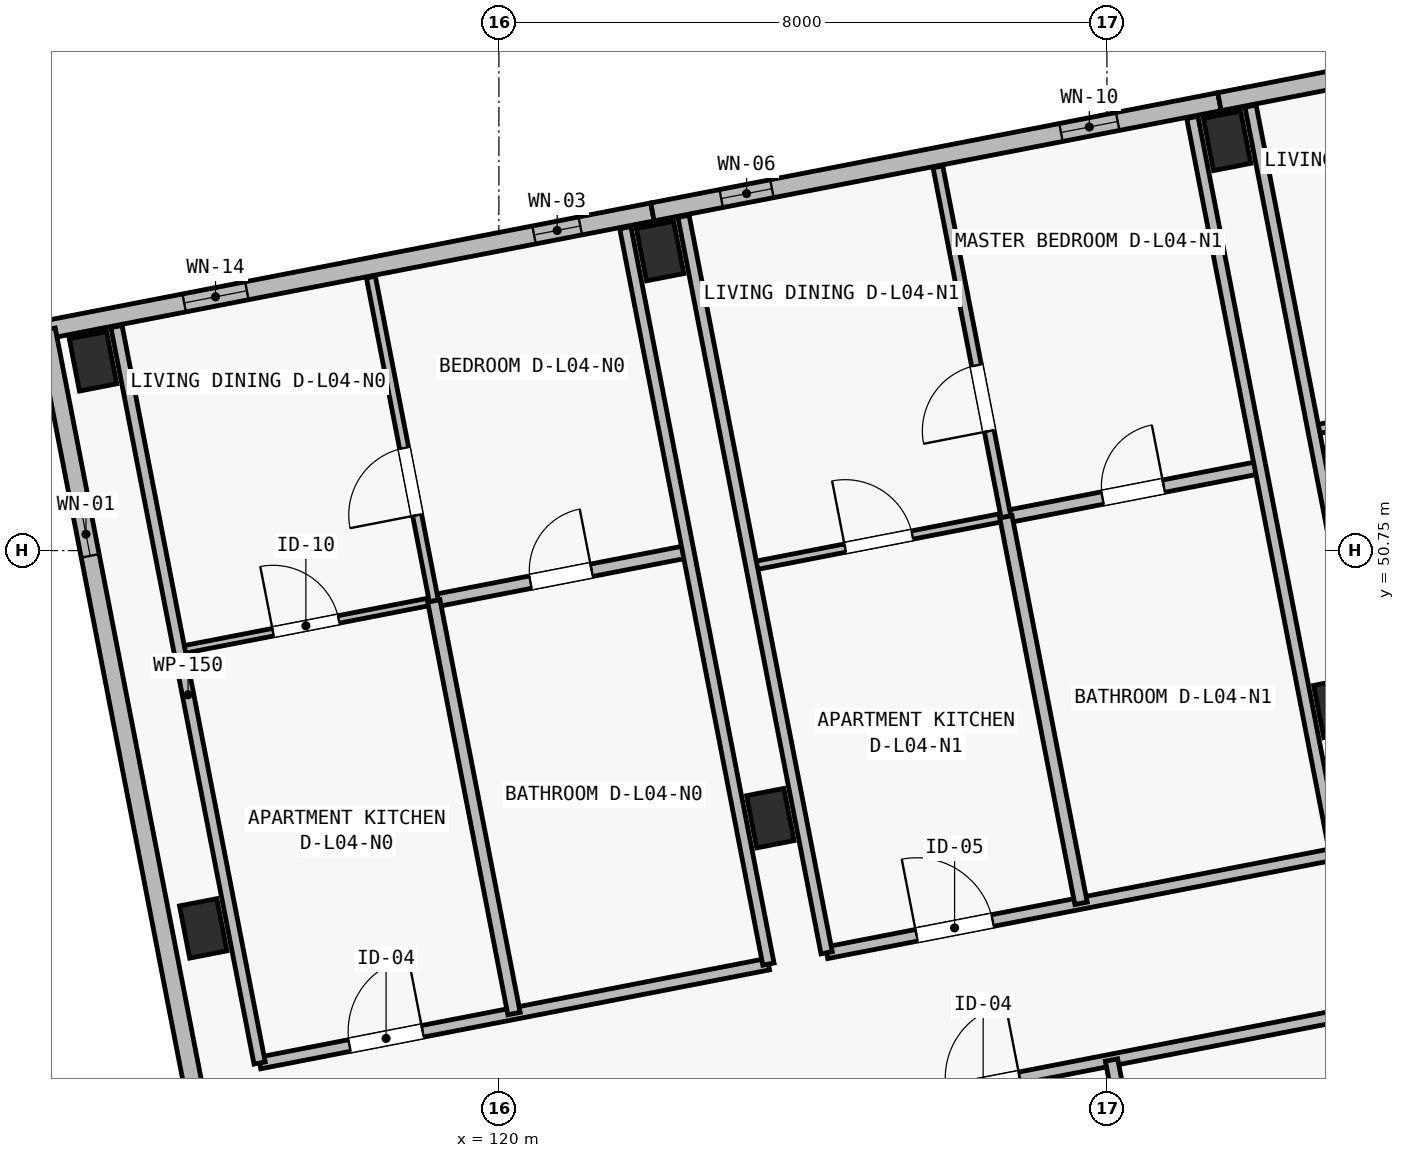
"""IFC4 building model, lengths in metres.
Left out: names, types, materials, properties, quantities, classifications, styles, units other than length and angle.
Written with IfcOpenShell. Run it as: python <this file> out.ifc"""

import sys

from ifc_helpers import new_model, si_unit, direction, frame, frame_2d, origin, origin_2d, place, context, subcontext, project, spatial, rectangle, extrude, element, fill, save


model = new_model("IFC4")
c1 = context("Model", 3, precision=1e-05, world=origin(), true_north=direction((0.0, 1.0)))
c2 = subcontext(c1, "Body", "Model", "MODEL_VIEW")
j1 = project(units=[si_unit("LENGTHUNIT", "METRE"), si_unit("PLANEANGLEUNIT", "RADIAN")], contexts=[c1])
p1 = place(None, origin())
s1 = spatial("IfcSite", under=j1, at=p1, CompositionType="ELEMENT")
p2 = place(p1, origin())
s2 = spatial("IfcBuilding", under=s1, at=p2, CompositionType="ELEMENT")
p3 = place(p2, frame((0.0, 0.0, 14.9)))
s3 = spatial("IfcBuildingStorey", under=s2, at=p3, CompositionType="ELEMENT", Elevation=14.9)
for number, where, z_axis, x_axis in (
    (1, (116.11, 45.78, 0.0), (0.0, 0.0, 1.0), (0.982, 0.191, 0.0)),
    (2, (114.66, 53.24, 0.0), (0.0, 0.0, 1.0), (0.982, 0.191, 0.0)),
    (3, (123.571, 47.23, 0.0), (0.0, 0.0, 1.0), (0.982, 0.191, 0.0)),
    (4, (122.121, 54.69, 0.0), (0.0, 0.0, 1.0), (0.982, 0.191, 0.0)),
    (5, (131.031, 48.68, 0.0), (0.0, 0.0, 1.0), (0.982, 0.191, 0.0)),
    (6, (129.581, 56.14, 0.0), (0.0, 0.0, 1.0), (0.982, 0.191, 0.0)),
):
    element("IfcColumn", number, at=place(p3, frame(where, z_axis=z_axis, x_axis=x_axis)), inside=s3, PredefinedType="COLUMN", context=c2, shape_type="SweptSolid", body=[
        extrude(rectangle(XDim=0.5, YDim=0.7, at=origin_2d()), origin(), (0.0, 0.0, 1.0), 3.25),
    ])
p4 = place(p3, frame((114.045, 53.655, 0.0), z_axis=(0.0, 0.0, 1.0), x_axis=(0.981627273155, 0.190808533872, 0.0)))
e7 = element("IfcWall", 7, at=p4, inside=s3, PredefinedType="SOLIDWALL", context=c2, shape_type="SweptSolid", body=[
    extrude(rectangle(XDim=8.125, YDim=0.24, at=frame_2d((4.062, 0.0))), origin(), (0.0, 0.0, 1.0), 3.0),
])
p5 = place(p4, frame((1.849, 0.0, 0.44)))
e8 = element("IfcOpeningElement", 8, at=p5, cuts=e7, PredefinedType="OPENING", context=c2, shape_type="SweptSolid", body=[
    extrude(rectangle(XDim=0.84, YDim=2.28, at=frame_2d((0.42, 1.14))), frame((0.0, 0.135, 0.0), z_axis=(0.0, -1.0, 0.0), x_axis=(1.0, 0.0, 0.0)), (0.0, 0.0, 1.0), 0.27),
])
p6 = place(p4, frame((6.538, 0.0, 0.5)))
e9 = element("IfcOpeningElement", 9, at=p6, cuts=e7, PredefinedType="OPENING", context=c2, shape_type="SweptSolid", body=[
    extrude(rectangle(XDim=0.62, YDim=2.28, at=frame_2d((0.31, 1.14))), frame((0.0, 0.135, 0.0), z_axis=(0.0, -1.0, 0.0), x_axis=(1.0, 0.0, 0.0)), (0.0, 0.0, 1.0), 0.27),
])
p7 = place(p3, frame((122.02, 55.205, 0.0), z_axis=(0.0, 0.0, 1.0), x_axis=(0.981626422232, 0.190812911449, 0.0)))
e10 = element("IfcWall", 10, at=p7, inside=s3, PredefinedType="SOLIDWALL", context=c2, shape_type="SweptSolid", body=[
    extrude(rectangle(XDim=7.6, YDim=0.24, at=frame_2d((3.8, 0.0))), origin(), (0.0, 0.0, 1.0), 3.0),
])
p8 = place(p7, frame((0.922, 0.0, 0.5)))
e11 = element("IfcOpeningElement", 11, at=p8, cuts=e10, PredefinedType="OPENING", context=c2, shape_type="SweptSolid", body=[
    extrude(rectangle(XDim=0.68, YDim=2.24, at=frame_2d((0.34, 1.12))), frame((0.0, 0.135, 0.0), z_axis=(0.0, -1.0, 0.0), x_axis=(1.0, 0.0, 0.0)), (0.0, 0.0, 1.0), 0.27),
])
p9 = place(p7, frame((5.476, 0.0, 0.44)))
e12 = element("IfcOpeningElement", 12, at=p9, cuts=e10, PredefinedType="OPENING", context=c2, shape_type="SweptSolid", body=[
    extrude(rectangle(XDim=0.76, YDim=2.34, at=frame_2d((0.38, 1.17))), frame((0.0, 0.135, 0.0), z_axis=(0.0, -1.0, 0.0), x_axis=(1.0, 0.0, 0.0)), (0.0, 0.0, 1.0), 0.27),
])
p10 = place(p3, frame((129.481, 56.656, 0.0), z_axis=(0.0, 0.0, 1.0), x_axis=(0.981626422232, 0.190812911449, 0.0)))
e13 = element("IfcWall", 13, at=p10, inside=s3, PredefinedType="SOLIDWALL", context=c2, shape_type="SweptSolid", body=[
    extrude(rectangle(XDim=7.6, YDim=0.24, at=frame_2d((3.8, 0.0))), origin(), (0.0, 0.0, 1.0), 3.0),
])
p11 = place(p10, frame((1.745, 0.0, 0.44)))
e14 = element("IfcOpeningElement", 14, at=p11, cuts=e13, PredefinedType="OPENING", context=c2, shape_type="SweptSolid", body=[
    extrude(rectangle(XDim=0.82, YDim=2.18, at=frame_2d((0.41, 1.09))), frame((0.0, 0.135, 0.0), z_axis=(0.0, -1.0, 0.0), x_axis=(1.0, 0.0, 0.0)), (0.0, 0.0, 1.0), 0.27),
])
p12 = place(p10, frame((5.05, 0.0, 0.5)))
e15 = element("IfcOpeningElement", 15, at=p12, cuts=e13, PredefinedType="OPENING", context=c2, shape_type="SweptSolid", body=[
    extrude(rectangle(XDim=0.6, YDim=2.22, at=frame_2d((0.3, 1.11))), frame((0.0, 0.135, 0.0), z_axis=(0.0, -1.0, 0.0), x_axis=(1.0, 0.0, 0.0)), (0.0, 0.0, 1.0), 0.27),
])
p13 = place(p3, frame((117.985, 33.385, 0.0), z_axis=(0.0, 0.0, 1.0), x_axis=(-0.190808900739, 0.981627201843, 0.0)))
e16 = element("IfcWall", 16, at=p13, inside=s3, PredefinedType="SOLIDWALL", context=c2, shape_type="SweptSolid", body=[
    extrude(rectangle(XDim=20.65, YDim=0.24, at=frame_2d((10.325, 0.0))), origin(), (0.0, 0.0, 1.0), 3.0),
])
p14 = place(p13, frame((2.45, 0.0, 0.45)))
e17 = element("IfcOpeningElement", 17, at=p14, cuts=e16, PredefinedType="OPENING", context=c2, shape_type="SweptSolid", body=[
    extrude(rectangle(XDim=0.74, YDim=2.26, at=frame_2d((0.37, 1.13))), frame((0.0, 0.135, 0.0), z_axis=(0.0, -1.0, 0.0), x_axis=(1.0, 0.0, 0.0)), (0.0, 0.0, 1.0), 0.27),
])
p15 = place(p13, frame((17.62, 0.0, 0.52)))
e18 = element("IfcOpeningElement", 18, at=p15, cuts=e16, PredefinedType="OPENING", context=c2, shape_type="SweptSolid", body=[
    extrude(rectangle(XDim=0.58, YDim=2.16, at=frame_2d((0.29, 1.08))), frame((0.0, 0.135, 0.0), z_axis=(0.0, -1.0, 0.0), x_axis=(1.0, 0.0, 0.0)), (0.0, 0.0, 1.0), 0.27),
])
p16 = place(p3, frame((124.585, 43.372, 0.0), z_axis=(0.0, 0.0, 1.0), x_axis=(0.9816234647, 0.190828125677, 0.0)))
e19 = element("IfcWall", 19, at=p16, inside=s3, PredefinedType="PARTITIONING", context=c2, shape_type="SweptSolid", body=[
    extrude(rectangle(XDim=7.08, YDim=0.155, at=frame_2d((3.54, 0.0))), origin(), (0.0, 0.0, 1.0), 2.97),
])
p17 = place(p16, frame((1.33, 0.0, 0.0)))
e20 = element("IfcOpeningElement", 20, at=p17, cuts=e19, PredefinedType="OPENING", context=c2, shape_type="SweptSolid", body=[
    extrude(rectangle(XDim=0.98, YDim=2.15, at=frame_2d((0.49, 1.075))), frame((0.0, 0.093, 0.0), z_axis=(0.0, -1.0, 0.0), x_axis=(1.0, 0.0, 0.0)), (0.0, 0.0, 1.0), 0.185),
])
p18 = place(p3, frame((128.77, 40.396, 0.0), z_axis=(0.0, 0.0, 1.0), x_axis=(-0.190787096078, 0.981631439987, 0.0)))
e21 = element("IfcWall", 21, at=p18, inside=s3, PredefinedType="PLUMBINGWALL", context=c2, shape_type="SweptSolid", body=[
    extrude(rectangle(XDim=3.72, YDim=0.165, at=frame_2d((1.86, 0.0))), origin(), (0.0, 0.0, 1.0), 2.97),
])
p19 = place(p3, frame((116.852, 44.009, 0.0), z_axis=(0.0, 0.0, 1.0), x_axis=(0.981629173664, 0.190798756314, 0.0)))
e22 = element("IfcWall", 22, at=p19, inside=s3, PredefinedType="PARTITIONING", context=c2, shape_type="SweptSolid", body=[
    extrude(rectangle(XDim=6.82, YDim=0.155, at=frame_2d((3.41, 0.0))), origin(), (0.0, 0.0, 1.0), 2.97),
])
p20 = place(p19, frame((1.205, 0.0, 0.0)))
e23 = element("IfcOpeningElement", 23, at=p20, cuts=e22, PredefinedType="OPENING", context=c2, shape_type="SweptSolid", body=[
    extrude(rectangle(XDim=0.98, YDim=2.15, at=frame_2d((0.49, 1.075))), frame((0.0, 0.093, 0.0), z_axis=(0.0, -1.0, 0.0), x_axis=(1.0, 0.0, 0.0)), (0.0, 0.0, 1.0), 0.185),
])
p21 = place(p3, frame((115.797, 49.437, 0.0), z_axis=(0.0, 0.0, 1.0), x_axis=(0.981615762271, 0.19086774285, 0.0)))
e24 = element("IfcWall", 24, at=p21, inside=s3, PredefinedType="PARTITIONING", context=c2, shape_type="SweptSolid", body=[
    extrude(rectangle(XDim=3.41, YDim=0.1, at=frame_2d((1.705, 0.0))), origin(), (0.0, 0.0, 1.0), 2.97),
])
p22 = place(p21, frame((1.255, 0.0, 0.0)))
e25 = element("IfcOpeningElement", 25, at=p22, cuts=e24, PredefinedType="OPENING", context=c2, shape_type="SweptSolid", body=[
    extrude(rectangle(XDim=0.88, YDim=2.1, at=frame_2d((0.44, 1.05))), frame((0.0, 0.065, 0.0), z_axis=(0.0, -1.0, 0.0), x_axis=(1.0, 0.0, 0.0)), (0.0, 0.0, 1.0), 0.13),
])
p23 = place(p3, frame((119.144, 50.088, 0.0), z_axis=(0.0, 0.0, 1.0), x_axis=(0.981629173664, 0.190798756314, 0.0)))
e26 = element("IfcWall", 26, at=p23, inside=s3, PredefinedType="PLUMBINGWALL", context=c2, shape_type="SweptSolid", body=[
    extrude(rectangle(XDim=3.41, YDim=0.165, at=frame_2d((1.705, 0.0))), origin(), (0.0, 0.0, 1.0), 2.97),
])
p24 = place(p23, frame((1.295, 0.0, 0.0)))
e27 = element("IfcOpeningElement", 27, at=p24, cuts=e26, PredefinedType="OPENING", context=c2, shape_type="SweptSolid", body=[
    extrude(rectangle(XDim=0.82, YDim=2.08, at=frame_2d((0.41, 1.04))), frame((0.0, 0.097, 0.0), z_axis=(0.0, -1.0, 0.0), x_axis=(1.0, 0.0, 0.0)), (0.0, 0.0, 1.0), 0.195),
])
p25 = place(p3, frame((119.144, 50.088, 0.0), z_axis=(0.0, 0.0, 1.0), x_axis=(-0.190812443151, 0.981626513262, 0.0)))
e28 = element("IfcWall", 28, at=p25, inside=s3, PredefinedType="PARTITIONING", context=c2, shape_type="SweptSolid", body=[
    extrude(rectangle(XDim=4.34, YDim=0.12, at=frame_2d((2.17, 0.0))), origin(), (0.0, 0.0, 1.0), 2.97),
])
p26 = place(p25, frame((1.15, 0.0, 0.0)))
e29 = element("IfcOpeningElement", 29, at=p26, cuts=e28, PredefinedType="OPENING", context=c2, shape_type="SweptSolid", body=[
    extrude(rectangle(XDim=0.9, YDim=2.1, at=frame_2d((0.45, 1.05))), frame((0.0, 0.075, 0.0), z_axis=(0.0, -1.0, 0.0), x_axis=(1.0, 0.0, 0.0)), (0.0, 0.0, 1.0), 0.15),
])
p27 = place(p3, frame((120.199, 44.659, 0.0), z_axis=(0.0, 0.0, 1.0), x_axis=(-0.190807031124, 0.981627565258, 0.0)))
e30 = element("IfcWall", 30, at=p27, inside=s3, PredefinedType="PLUMBINGWALL", context=c2, shape_type="SweptSolid", body=[
    extrude(rectangle(XDim=5.53, YDim=0.165, at=frame_2d((2.765, 0.0))), origin(), (0.0, 0.0, 1.0), 2.97),
])
p28 = place(p3, frame((116.852, 44.009, 0.0), z_axis=(0.0, 0.0, 1.0), x_axis=(-0.190814044018, 0.981626202078, 0.0)))
e31 = element("IfcWall", 31, at=p28, inside=s3, PredefinedType="PARTITIONING", context=c2, shape_type="SweptSolid", body=[
    extrude(rectangle(XDim=9.87, YDim=0.15, at=frame_2d((4.935, 0.0))), origin(), (0.0, 0.0, 1.0), 2.97),
])
p29 = place(p3, frame((123.547, 45.31, 0.0), z_axis=(0.0, 0.0, 1.0), x_axis=(-0.190809410863, 0.981627102685, 0.0)))
e32 = element("IfcWall", 32, at=p29, inside=s3, PredefinedType="PARTITIONING", context=c2, shape_type="SweptSolid", body=[
    extrude(rectangle(XDim=9.87, YDim=0.15, at=frame_2d((4.935, 0.0))), origin(), (0.0, 0.0, 1.0), 2.97),
])
p30 = place(p3, frame((124.312, 45.459, 0.0), z_axis=(0.0, 0.0, 1.0), x_axis=(0.981627870431, 0.190805461121, 0.0)))
e33 = element("IfcWall", 33, at=p30, inside=s3, PredefinedType="PARTITIONING", context=c2, shape_type="SweptSolid", body=[
    extrude(rectangle(XDim=6.82, YDim=0.155, at=frame_2d((3.41, 0.0))), origin(), (0.0, 0.0, 1.0), 2.97),
])
p31 = place(p30, frame((1.205, 0.0, 0.0)))
e34 = element("IfcOpeningElement", 34, at=p31, cuts=e33, PredefinedType="OPENING", context=c2, shape_type="SweptSolid", body=[
    extrude(rectangle(XDim=1.02, YDim=2.2, at=frame_2d((0.51, 1.1))), frame((0.0, 0.093, 0.0), z_axis=(0.0, -1.0, 0.0), x_axis=(1.0, 0.0, 0.0)), (0.0, 0.0, 1.0), 0.185),
])
p32 = place(p3, frame((123.324, 50.543, 0.0), z_axis=(0.0, 0.0, 1.0), x_axis=(0.981629173664, 0.190798756314, 0.0)))
e35 = element("IfcWall", 35, at=p32, inside=s3, PredefinedType="PARTITIONING", context=c2, shape_type="SweptSolid", body=[
    extrude(rectangle(XDim=3.41, YDim=0.11, at=frame_2d((1.705, 0.0))), origin(), (0.0, 0.0, 1.0), 2.97),
])
p33 = place(p32, frame((1.255, 0.0, 0.0)))
e36 = element("IfcOpeningElement", 36, at=p33, cuts=e35, PredefinedType="OPENING", context=c2, shape_type="SweptSolid", body=[
    extrude(rectangle(XDim=0.9, YDim=2.1, at=frame_2d((0.45, 1.05))), frame((0.0, 0.07, 0.0), z_axis=(0.0, -1.0, 0.0), x_axis=(1.0, 0.0, 0.0)), (0.0, 0.0, 1.0), 0.14),
])
p34 = place(p3, frame((126.671, 51.194, 0.0), z_axis=(0.0, 0.0, 1.0), x_axis=(0.981629173664, 0.190798756314, 0.0)))
e37 = element("IfcWall", 37, at=p34, inside=s3, PredefinedType="PLUMBINGWALL", context=c2, shape_type="SweptSolid", body=[
    extrude(rectangle(XDim=3.41, YDim=0.165, at=frame_2d((1.705, 0.0))), origin(), (0.0, 0.0, 1.0), 2.97),
])
p35 = place(p34, frame((1.295, 0.0, 0.0)))
e38 = element("IfcOpeningElement", 38, at=p35, cuts=e37, PredefinedType="OPENING", context=c2, shape_type="SweptSolid", body=[
    extrude(rectangle(XDim=0.82, YDim=2.08, at=frame_2d((0.41, 1.04))), frame((0.0, 0.097, 0.0), z_axis=(0.0, -1.0, 0.0), x_axis=(1.0, 0.0, 0.0)), (0.0, 0.0, 1.0), 0.195),
])
p36 = place(p3, frame((126.671, 51.194, 0.0), z_axis=(0.0, 0.0, 1.0), x_axis=(-0.190787451574, 0.981631370893, 0.0)))
e39 = element("IfcWall", 39, at=p36, inside=s3, PredefinedType="PARTITIONING", context=c2, shape_type="SweptSolid", body=[
    extrude(rectangle(XDim=4.69, YDim=0.13, at=frame_2d((2.345, 0.0))), origin(), (0.0, 0.0, 1.0), 2.97),
])
p37 = place(p36, frame((1.15, 0.0, 0.0)))
e40 = element("IfcOpeningElement", 40, at=p37, cuts=e39, PredefinedType="OPENING", context=c2, shape_type="SweptSolid", body=[
    extrude(rectangle(XDim=0.88, YDim=2.1, at=frame_2d((0.44, 1.05))), frame((0.0, 0.08, 0.0), z_axis=(0.0, -1.0, 0.0), x_axis=(1.0, 0.0, 0.0)), (0.0, 0.0, 1.0), 0.16),
])
p38 = place(p3, frame((127.66, 46.109, 0.0), z_axis=(0.0, 0.0, 1.0), x_axis=(-0.190838120755, 0.981621521599, 0.0)))
e41 = element("IfcWall", 41, at=p38, inside=s3, PredefinedType="PLUMBINGWALL", context=c2, shape_type="SweptSolid", body=[
    extrude(rectangle(XDim=5.18, YDim=0.165, at=frame_2d((2.59, 0.0))), origin(), (0.0, 0.0, 1.0), 2.97),
])
p39 = place(p3, frame((124.312, 45.459, 0.0), z_axis=(0.0, 0.0, 1.0), x_axis=(-0.190814044018, 0.981626202078, 0.0)))
e42 = element("IfcWall", 42, at=p39, inside=s3, PredefinedType="PARTITIONING", context=c2, shape_type="SweptSolid", body=[
    extrude(rectangle(XDim=9.87, YDim=0.15, at=frame_2d((4.935, 0.0))), origin(), (0.0, 0.0, 1.0), 2.97),
])
p40 = place(p3, frame((131.007, 46.76, 0.0), z_axis=(0.0, 0.0, 1.0), x_axis=(-0.190809410863, 0.981627102685, 0.0)))
e43 = element("IfcWall", 43, at=p40, inside=s3, PredefinedType="PARTITIONING", context=c2, shape_type="SweptSolid", body=[
    extrude(rectangle(XDim=9.87, YDim=0.15, at=frame_2d((4.935, 0.0))), origin(), (0.0, 0.0, 1.0), 2.97),
])
p41 = place(p3, frame((130.717, 52.337, 0.0), z_axis=(0.0, 0.0, 1.0), x_axis=(0.981629173664, 0.190798756314, 0.0)))
e44 = element("IfcWall", 44, at=p41, inside=s3, PredefinedType="PARTITIONING", context=c2, shape_type="SweptSolid", body=[
    extrude(rectangle(XDim=3.41, YDim=0.12, at=frame_2d((1.705, 0.0))), origin(), (0.0, 0.0, 1.0), 2.97),
])
p42 = place(p41, frame((1.255, 0.0, 0.0)))
e45 = element("IfcOpeningElement", 45, at=p42, cuts=e44, PredefinedType="OPENING", context=c2, shape_type="SweptSolid", body=[
    extrude(rectangle(XDim=0.9, YDim=2.1, at=frame_2d((0.45, 1.05))), frame((0.0, 0.075, 0.0), z_axis=(0.0, -1.0, 0.0), x_axis=(1.0, 0.0, 0.0)), (0.0, 0.0, 1.0), 0.15),
])
p43 = place(p3, frame((131.772, 46.909, 0.0), z_axis=(0.0, 0.0, 1.0), x_axis=(-0.1907855758, 0.981631735462, 0.0)))
e46 = element("IfcWall", 46, at=p43, inside=s3, PredefinedType="PARTITIONING", context=c2, shape_type="SweptSolid", body=[
    extrude(rectangle(XDim=9.87, YDim=0.15, at=frame_2d((4.935, 0.0))), origin(), (0.0, 0.0, 1.0), 2.97),
])
p44 = place(p5, origin())
e47 = element("IfcWindow", 47, at=p44, inside=s3, PartitioningType="SINGLE_PANEL", PredefinedType="WINDOW", context=c2, shape_type="SweptSolid", body=[
    extrude(rectangle(XDim=0.84, YDim=2.28, at=frame_2d((0.42, 1.14))), frame((0.0, 0.03, 0.0), z_axis=(0.0, -1.0, 0.0), x_axis=(1.0, 0.0, 0.0)), (0.0, 0.0, 1.0), 0.06),
])
fill(e8, e47)
p45 = place(p6, origin())
e48 = element("IfcWindow", 48, at=p45, inside=s3, PartitioningType="SINGLE_PANEL", PredefinedType="WINDOW", context=c2, shape_type="SweptSolid", body=[
    extrude(rectangle(XDim=0.62, YDim=2.28, at=frame_2d((0.31, 1.14))), frame((0.0, 0.03, 0.0), z_axis=(0.0, -1.0, 0.0), x_axis=(1.0, 0.0, 0.0)), (0.0, 0.0, 1.0), 0.06),
])
fill(e9, e48)
p46 = place(p8, origin())
e49 = element("IfcWindow", 49, at=p46, inside=s3, PartitioningType="SINGLE_PANEL", PredefinedType="WINDOW", context=c2, shape_type="SweptSolid", body=[
    extrude(rectangle(XDim=0.68, YDim=2.24, at=frame_2d((0.34, 1.12))), frame((0.0, 0.03, 0.0), z_axis=(0.0, -1.0, 0.0), x_axis=(1.0, 0.0, 0.0)), (0.0, 0.0, 1.0), 0.06),
])
fill(e11, e49)
p47 = place(p9, origin())
e50 = element("IfcWindow", 50, at=p47, inside=s3, PartitioningType="SINGLE_PANEL", PredefinedType="WINDOW", context=c2, shape_type="SweptSolid", body=[
    extrude(rectangle(XDim=0.76, YDim=2.34, at=frame_2d((0.38, 1.17))), frame((0.0, 0.03, 0.0), z_axis=(0.0, -1.0, 0.0), x_axis=(1.0, 0.0, 0.0)), (0.0, 0.0, 1.0), 0.06),
])
fill(e12, e50)
p48 = place(p15, origin())
e51 = element("IfcWindow", 51, at=p48, inside=s3, PartitioningType="SINGLE_PANEL", PredefinedType="WINDOW", context=c2, shape_type="SweptSolid", body=[
    extrude(rectangle(XDim=0.58, YDim=2.16, at=frame_2d((0.29, 1.08))), frame((0.0, 0.03, 0.0), z_axis=(0.0, -1.0, 0.0), x_axis=(1.0, 0.0, 0.0)), (0.0, 0.0, 1.0), 0.06),
])
fill(e18, e51)
p49 = place(p17, origin())
e52 = element("IfcDoor", 52, at=p49, inside=s3, OperationType="SINGLE_SWING_RIGHT", PredefinedType="DOOR", context=c2, shape_type="SweptSolid", body=[
    extrude(rectangle(XDim=0.98, YDim=2.15, at=frame_2d((0.49, 1.075))), frame((0.0, 0.025, 0.0), z_axis=(0.0, -1.0, 0.0), x_axis=(1.0, 0.0, 0.0)), (0.0, 0.0, 1.0), 0.05),
])
fill(e20, e52)
p50 = place(p20, origin())
e53 = element("IfcDoor", 53, at=p50, inside=s3, OperationType="SINGLE_SWING_RIGHT", PredefinedType="DOOR", context=c2, shape_type="SweptSolid", body=[
    extrude(rectangle(XDim=0.98, YDim=2.15, at=frame_2d((0.49, 1.075))), frame((0.0, 0.025, 0.0), z_axis=(0.0, -1.0, 0.0), x_axis=(1.0, 0.0, 0.0)), (0.0, 0.0, 1.0), 0.05),
])
fill(e23, e53)
p51 = place(p22, origin())
e54 = element("IfcDoor", 54, at=p51, inside=s3, OperationType="SINGLE_SWING_LEFT", PredefinedType="DOOR", context=c2, shape_type="SweptSolid", body=[
    extrude(rectangle(XDim=0.88, YDim=2.1, at=frame_2d((0.44, 1.05))), frame((0.0, 0.025, 0.0), z_axis=(0.0, -1.0, 0.0), x_axis=(1.0, 0.0, 0.0)), (0.0, 0.0, 1.0), 0.05),
])
fill(e25, e54)
p52 = place(p24, origin())
e55 = element("IfcDoor", 55, at=p52, inside=s3, OperationType="SINGLE_SWING_RIGHT", PredefinedType="DOOR", context=c2, shape_type="SweptSolid", body=[
    extrude(rectangle(XDim=0.82, YDim=2.08, at=frame_2d((0.41, 1.04))), frame((0.0, 0.025, 0.0), z_axis=(0.0, -1.0, 0.0), x_axis=(1.0, 0.0, 0.0)), (0.0, 0.0, 1.0), 0.05),
])
fill(e27, e55)
p53 = place(p26, origin())
e56 = element("IfcDoor", 56, at=p53, inside=s3, OperationType="SINGLE_SWING_LEFT", PredefinedType="DOOR", context=c2, shape_type="SweptSolid", body=[
    extrude(rectangle(XDim=0.9, YDim=2.1, at=frame_2d((0.45, 1.05))), frame((0.0, 0.025, 0.0), z_axis=(0.0, -1.0, 0.0), x_axis=(1.0, 0.0, 0.0)), (0.0, 0.0, 1.0), 0.05),
])
fill(e29, e56)
p54 = place(p31, origin())
e57 = element("IfcDoor", 57, at=p54, inside=s3, OperationType="SINGLE_SWING_LEFT", PredefinedType="DOOR", context=c2, shape_type="SweptSolid", body=[
    extrude(rectangle(XDim=1.02, YDim=2.2, at=frame_2d((0.51, 1.1))), frame((0.0, 0.025, 0.0), z_axis=(0.0, -1.0, 0.0), x_axis=(1.0, 0.0, 0.0)), (0.0, 0.0, 1.0), 0.05),
])
fill(e34, e57)
p55 = place(p33, origin())
e58 = element("IfcDoor", 58, at=p55, inside=s3, OperationType="SINGLE_SWING_LEFT", PredefinedType="DOOR", context=c2, shape_type="SweptSolid", body=[
    extrude(rectangle(XDim=0.9, YDim=2.1, at=frame_2d((0.45, 1.05))), frame((0.0, 0.025, 0.0), z_axis=(0.0, -1.0, 0.0), x_axis=(1.0, 0.0, 0.0)), (0.0, 0.0, 1.0), 0.05),
])
fill(e36, e58)
p56 = place(p35, origin())
e59 = element("IfcDoor", 59, at=p56, inside=s3, OperationType="SINGLE_SWING_RIGHT", PredefinedType="DOOR", context=c2, shape_type="SweptSolid", body=[
    extrude(rectangle(XDim=0.82, YDim=2.08, at=frame_2d((0.41, 1.04))), frame((0.0, 0.025, 0.0), z_axis=(0.0, -1.0, 0.0), x_axis=(1.0, 0.0, 0.0)), (0.0, 0.0, 1.0), 0.05),
])
fill(e38, e59)
p57 = place(p37, origin())
e60 = element("IfcDoor", 60, at=p57, inside=s3, OperationType="SINGLE_SWING_LEFT", PredefinedType="DOOR", context=c2, shape_type="SweptSolid", body=[
    extrude(rectangle(XDim=0.88, YDim=2.1, at=frame_2d((0.44, 1.05))), frame((0.0, 0.025, 0.0), z_axis=(0.0, -1.0, 0.0), x_axis=(1.0, 0.0, 0.0)), (0.0, 0.0, 1.0), 0.05),
])
fill(e40, e60)
save(model, sys.argv[1])
